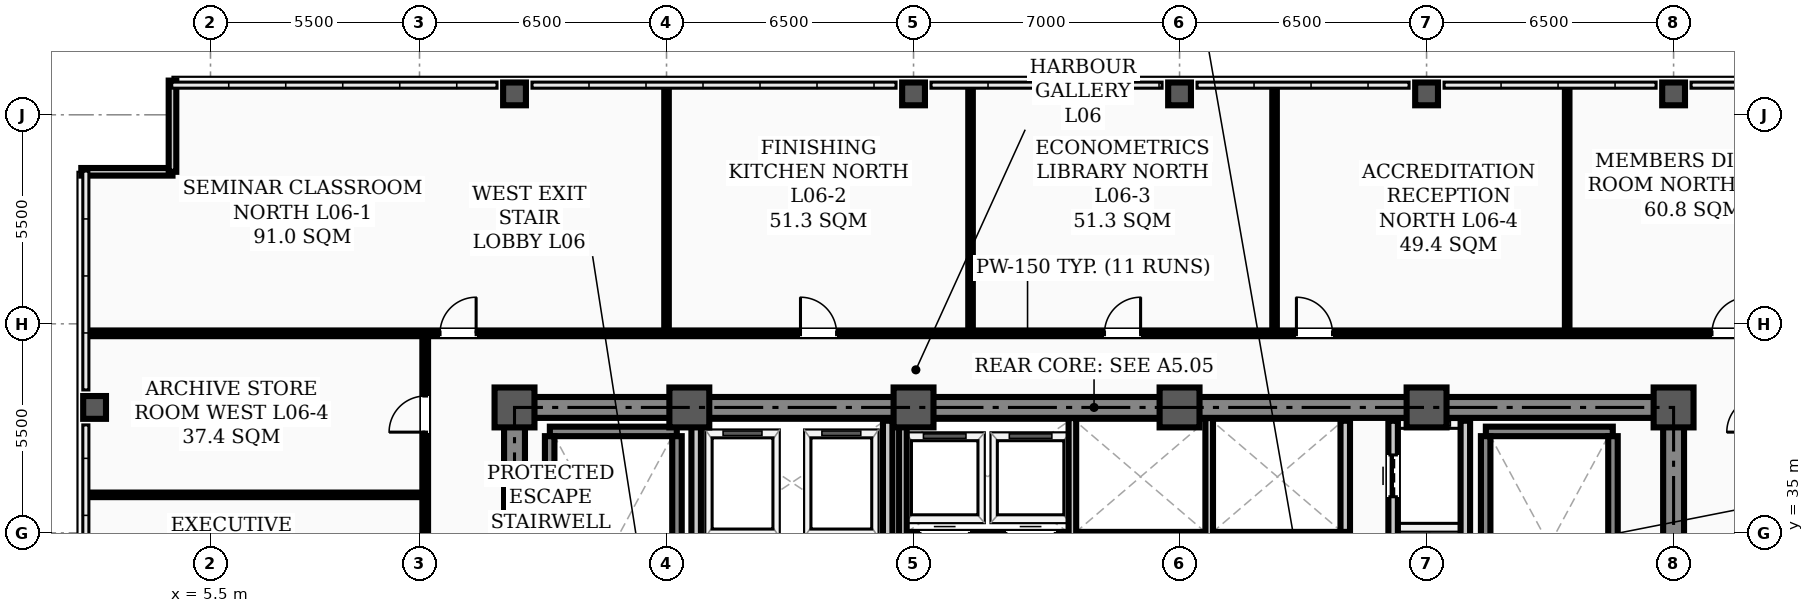
"""IFC4 building model, lengths in metres.
Left out: names, types, materials, properties, quantities, classifications, styles, units other than length and angle.
Written with IfcOpenShell. Run it as: python <this file> out.ifc"""

import sys

from ifc_helpers import new_model, si_unit, direction, frame, frame_2d, origin, origin_2d, place, context, subcontext, project, spatial, rectangle, hollow_rectangle, extrude, element, fill, save


model = new_model("IFC4")
c1 = context("Model", 3, precision=1e-05, world=origin(), true_north=direction((0.0, 1.0)))
c2 = subcontext(c1, "Body", "Model", "MODEL_VIEW")
j1 = project(units=[si_unit("LENGTHUNIT", "METRE"), si_unit("PLANEANGLEUNIT", "RADIAN")], contexts=[c1])
p1 = place(None, origin())
s1 = spatial("IfcSite", under=j1, at=p1, CompositionType="ELEMENT")
p2 = place(p1, origin())
s2 = spatial("IfcBuilding", under=s1, at=p2, CompositionType="ELEMENT")
p3 = place(p2, frame((0.0, 0.0, 26.5)))
s3 = spatial("IfcBuildingStorey", under=s2, at=p3, CompositionType="ELEMENT", Elevation=26.5)
for number, where, z_axis, x_axis in (
    (1, (13.5, 38.3, 0.0), (0.0, 0.0, 1.0), (1.0, 0.0, 0.0)),
    (2, (18.1, 38.3, 0.0), (0.0, 0.0, 1.0), (1.0, 0.0, 0.0)),
    (3, (24.0, 38.3, 0.0), (0.0, 0.0, 1.0), (1.0, 0.0, 0.0)),
    (4, (31.0, 38.3, 0.0), (0.0, 0.0, 1.0), (1.0, 0.0, 0.0)),
    (5, (37.5, 38.3, 0.0), (0.0, 0.0, 1.0), (1.0, 0.0, 0.0)),
    (6, (44.0, 38.3, 0.0), (0.0, 0.0, 1.0), (1.0, 0.0, 0.0)),
):
    element("IfcColumn", number, at=place(p3, frame(where, z_axis=z_axis, x_axis=x_axis)), inside=s3, PredefinedType="COLUMN", context=c2, shape_type="SweptSolid", body=[
        extrude(hollow_rectangle(XDim=1.05, YDim=1.05, WallThickness=0.038, InnerFilletRadius=0.019, OuterFilletRadius=0.057, at=origin_2d()), origin(), (0.0, 0.0, 1.0), 3.9),
    ])
for number, where, z_axis, x_axis in (
    (7, (2.45, 38.3, 0.0), (0.0, 0.0, 1.0), (1.0, 0.0, 0.0)),
    (8, (13.5, 46.55, 0.0), (0.0, 0.0, 1.0), (1.0, 0.0, 0.0)),
    (9, (24.0, 46.55, 0.0), (0.0, 0.0, 1.0), (1.0, 0.0, 0.0)),
    (10, (31.0, 46.55, 0.0), (0.0, 0.0, 1.0), (1.0, 0.0, 0.0)),
    (11, (37.5, 46.55, 0.0), (0.0, 0.0, 1.0), (1.0, 0.0, 0.0)),
    (12, (44.0, 46.55, 0.0), (0.0, 0.0, 1.0), (1.0, 0.0, 0.0)),
):
    element("IfcColumn", number, at=place(p3, frame(where, z_axis=z_axis, x_axis=x_axis)), inside=s3, PredefinedType="COLUMN", context=c2, shape_type="SweptSolid", body=[
        extrude(hollow_rectangle(XDim=0.6, YDim=0.6, WallThickness=0.026, InnerFilletRadius=0.013, OuterFilletRadius=0.039, at=origin_2d()), origin(), (0.0, 0.0, 1.0), 3.9),
    ])
for number, where, z_axis, x_axis in (
    (13, (2.1, 44.5, 0.0), (0.0, 0.0, 1.0), (1.0, 0.0, 0.0)),
    (14, (4.5, 44.5, 0.0), (0.0, 0.0, 1.0), (0.0, 1.0, 0.0)),
):
    element("IfcWall", number, at=place(p3, frame(where, z_axis=z_axis, x_axis=x_axis)), inside=s3, PredefinedType="PARAPET", context=c2, shape_type="SweptSolid", body=[
        extrude(rectangle(XDim=2.4, YDim=0.2, at=frame_2d((1.2, 0.0))), origin(), (0.0, 0.0, 1.0), 1.2),
    ])
p4 = place(p3, frame((13.5, 38.3, 0.0), z_axis=(0.0, 0.0, 1.0), x_axis=(1.0, 0.0, 0.0)))
e15 = element("IfcWall", 15, at=p4, inside=s3, PredefinedType="SHEAR", context=c2, shape_type="SweptSolid", body=[
    extrude(rectangle(XDim=30.5, YDim=0.55, at=frame_2d((15.25, 0.0))), origin(), (0.0, 0.0, 1.0), 3.72),
])
for number, where, z_axis, x_axis in (
    (16, (13.5, 29.35, 0.0), (0.0, 0.0, 1.0), (0.0, 1.0, 0.0)),
    (17, (44.0, 29.35, 0.0), (0.0, 0.0, 1.0), (0.0, 1.0, 0.0)),
):
    element("IfcWall", number, at=place(p3, frame(where, z_axis=z_axis, x_axis=x_axis)), inside=s3, PredefinedType="SHEAR", context=c2, shape_type="SweptSolid", body=[
        extrude(rectangle(XDim=8.6, YDim=0.55, at=frame_2d((4.3, 0.0))), origin(), (0.0, 0.0, 1.0), 3.72),
    ])
p5 = place(p3, frame((14.43, 37.669, 0.0), z_axis=(0.0, 0.0, 1.0), x_axis=(1.0, 0.0, 0.0)))
e18 = element("IfcWall", 18, at=p5, inside=s3, PredefinedType="STANDARD", context=c2, shape_type="SweptSolid", body=[
    extrude(rectangle(XDim=3.34, YDim=0.25, at=frame_2d((1.67, 0.0))), origin(), (0.0, 0.0, 1.0), 3.72),
])
for number, where, z_axis, x_axis in (
    (19, (14.425, 30.36, 0.0), (0.0, 0.0, 1.0), (0.0, 1.0, 0.0)),
    (20, (17.775, 30.36, 0.0), (0.0, 0.0, 1.0), (0.0, 1.0, 0.0)),
):
    element("IfcWall", number, at=place(p3, frame(where, z_axis=z_axis, x_axis=x_axis)), inside=s3, PredefinedType="STANDARD", context=c2, shape_type="SweptSolid", body=[
        extrude(rectangle(XDim=7.184, YDim=0.25, at=frame_2d((3.592, 0.0))), origin(), (0.0, 0.0, 1.0), 3.72),
    ])
p6 = place(p3, frame((39.06, 37.669, 0.0), z_axis=(0.0, 0.0, 1.0), x_axis=(1.0, 0.0, 0.0)))
e21 = element("IfcWall", 21, at=p6, inside=s3, PredefinedType="STANDARD", context=c2, shape_type="SweptSolid", body=[
    extrude(rectangle(XDim=3.34, YDim=0.25, at=frame_2d((1.67, 0.0))), origin(), (0.0, 0.0, 1.0), 3.72),
])
for number, where, z_axis, x_axis in (
    (22, (39.055, 30.36, 0.0), (0.0, 0.0, 1.0), (0.0, 1.0, 0.0)),
    (23, (42.405, 30.36, 0.0), (0.0, 0.0, 1.0), (0.0, 1.0, 0.0)),
):
    element("IfcWall", number, at=place(p3, frame(where, z_axis=z_axis, x_axis=x_axis)), inside=s3, PredefinedType="STANDARD", context=c2, shape_type="SweptSolid", body=[
        extrude(rectangle(XDim=7.184, YDim=0.25, at=frame_2d((3.592, 0.0))), origin(), (0.0, 0.0, 1.0), 3.72),
    ])
p7 = place(p3, frame((36.62, 31.95, 0.0), z_axis=(0.0, 0.0, 1.0), x_axis=(0.0, 1.0, 0.0)))
e24 = element("IfcWall", 24, at=p7, inside=s3, PredefinedType="STANDARD", context=c2, shape_type="SweptSolid", body=[
    extrude(rectangle(XDim=6.0, YDim=0.25, at=frame_2d((3.0, 0.0))), origin(), (0.0, 0.0, 1.0), 3.3),
])
p8 = place(p7, frame((0.9, 0.0, 0.0)))
e25 = element("IfcOpeningElement", 25, at=p8, cuts=e24, PredefinedType="OPENING", context=c2, shape_type="SweptSolid", body=[
    extrude(rectangle(XDim=1.1, YDim=2.08, at=frame_2d((0.55, 1.04))), frame((0.0, 0.135, 0.0), z_axis=(0.0, -1.0, 0.0), x_axis=(1.0, 0.0, 0.0)), (0.0, 0.0, 1.0), 0.27),
])
p9 = place(p7, frame((4.0, 0.0, 0.0)))
e26 = element("IfcOpeningElement", 26, at=p9, cuts=e24, PredefinedType="OPENING", context=c2, shape_type="SweptSolid", body=[
    extrude(rectangle(XDim=1.1, YDim=2.08, at=frame_2d((0.55, 1.04))), frame((0.0, 0.135, 0.0), z_axis=(0.0, -1.0, 0.0), x_axis=(1.0, 0.0, 0.0)), (0.0, 0.0, 1.0), 0.27),
])
p10 = place(p3, frame((38.52, 31.95, 0.0), z_axis=(0.0, 0.0, 1.0), x_axis=(0.0, 1.0, 0.0)))
e27 = element("IfcWall", 27, at=p10, inside=s3, PredefinedType="STANDARD", context=c2, shape_type="SweptSolid", body=[
    extrude(rectangle(XDim=6.0, YDim=0.25, at=frame_2d((3.0, 0.0))), origin(), (0.0, 0.0, 1.0), 3.3),
])
for number, where, z_axis, x_axis in (
    (28, (18.28, 34.62, 0.0), (0.0, 0.0, 1.0), (0.0, 1.0, 0.0)),
    (29, (23.32, 34.62, 0.0), (0.0, 0.0, 1.0), (0.0, 1.0, 0.0)),
):
    element("IfcWall", number, at=place(p3, frame(where, z_axis=z_axis, x_axis=x_axis)), inside=s3, PredefinedType="STANDARD", context=c2, shape_type="SweptSolid", body=[
        extrude(rectangle(XDim=3.33, YDim=0.25, at=frame_2d((1.665, 0.0))), origin(), (0.0, 0.0, 1.0), 3.3),
    ])
p11 = place(p3, frame((35.36, 34.9, 0.0), z_axis=(0.0, 0.0, 1.0), x_axis=(0.0, 1.0, 0.0)))
e30 = element("IfcWall", 30, at=p11, inside=s3, PredefinedType="STANDARD", context=c2, shape_type="SweptSolid", body=[
    extrude(rectangle(XDim=3.05, YDim=0.25, at=frame_2d((1.525, 0.0))), origin(), (0.0, 0.0, 1.0), 3.3),
])
p12 = place(p3, frame((23.75, 34.9, 0.0), z_axis=(0.0, 0.0, 1.0), x_axis=(1.0, 0.0, 0.0)))
e31 = element("IfcWall", 31, at=p12, inside=s3, PredefinedType="STANDARD", context=c2, shape_type="SweptSolid", body=[
    extrude(rectangle(XDim=4.4, YDim=0.25, at=frame_2d((2.2, 0.0))), origin(), (0.0, 0.0, 1.0), 3.72),
])
p13 = place(p12, frame((0.42, 0.0, 0.0)))
e32 = element("IfcOpeningElement", 32, at=p13, cuts=e31, PredefinedType="OPENING", context=c2, shape_type="SweptSolid", body=[
    extrude(rectangle(XDim=1.3, YDim=2.08, at=frame_2d((0.65, 1.04))), frame((0.0, 0.135, 0.0), z_axis=(0.0, -1.0, 0.0), x_axis=(1.0, 0.0, 0.0)), (0.0, 0.0, 1.0), 0.27),
])
p14 = place(p12, frame((2.68, 0.0, 0.0)))
e33 = element("IfcOpeningElement", 33, at=p14, cuts=e31, PredefinedType="OPENING", context=c2, shape_type="SweptSolid", body=[
    extrude(rectangle(XDim=1.3, YDim=2.08, at=frame_2d((0.65, 1.04))), frame((0.0, 0.135, 0.0), z_axis=(0.0, -1.0, 0.0), x_axis=(1.0, 0.0, 0.0)), (0.0, 0.0, 1.0), 0.27),
])
p15 = place(p3, frame((28.2, 34.9, 0.0), z_axis=(0.0, 0.0, 1.0), x_axis=(1.0, 0.0, 0.0)))
e34 = element("IfcWall", 34, at=p15, inside=s3, PredefinedType="STANDARD", context=c2, shape_type="SweptSolid", body=[
    extrude(rectangle(XDim=3.55, YDim=0.25, at=frame_2d((1.775, 0.0))), origin(), (0.0, 0.0, 1.0), 3.72),
])
p16 = place(p3, frame((31.8, 34.9, 0.0), z_axis=(0.0, 0.0, 1.0), x_axis=(1.0, 0.0, 0.0)))
e35 = element("IfcWall", 35, at=p16, inside=s3, PredefinedType="STANDARD", context=c2, shape_type="SweptSolid", body=[
    extrude(rectangle(XDim=3.6, YDim=0.25, at=frame_2d((1.8, 0.0))), origin(), (0.0, 0.0, 1.0), 3.72),
])
p17 = place(p3, frame((2.31, 36.0, 0.0), z_axis=(0.0, 0.0, 1.0), x_axis=(1.0, 0.0, 0.0)))
e36 = element("IfcWall", 36, at=p17, inside=s3, PredefinedType="PARTITIONING", context=c2, shape_type="SweptSolid", body=[
    extrude(rectangle(XDim=8.84, YDim=0.12, at=frame_2d((4.42, 0.0))), origin(), (0.0, 0.0, 1.0), 3.212),
])
p18 = place(p3, frame((2.31, 40.25, 0.0), z_axis=(0.0, 0.0, 1.0), x_axis=(1.0, 0.0, 0.0)))
e37 = element("IfcWall", 37, at=p18, inside=s3, PredefinedType="PARTITIONING", context=c2, shape_type="SweptSolid", body=[
    extrude(rectangle(XDim=49.38, YDim=0.15, at=frame_2d((24.69, 0.0))), origin(), (0.0, 0.0, 1.0), 3.1),
])
p19 = place(p18, frame((9.23, 0.0, 0.0)))
e38 = element("IfcOpeningElement", 38, at=p19, cuts=e37, PredefinedType="OPENING", context=c2, shape_type="SweptSolid", body=[
    extrude(rectangle(XDim=0.95, YDim=2.08, at=frame_2d((0.475, 1.04))), frame((0.0, 0.085, 0.0), z_axis=(0.0, -1.0, 0.0), x_axis=(1.0, 0.0, 0.0)), (0.0, 0.0, 1.0), 0.17),
])
p20 = place(p18, frame((18.715, 0.0, 0.0)))
e39 = element("IfcOpeningElement", 39, at=p20, cuts=e37, PredefinedType="OPENING", context=c2, shape_type="SweptSolid", body=[
    extrude(rectangle(XDim=0.95, YDim=2.08, at=frame_2d((0.475, 1.04))), frame((0.0, 0.085, 0.0), z_axis=(0.0, -1.0, 0.0), x_axis=(1.0, 0.0, 0.0)), (0.0, 0.0, 1.0), 0.17),
])
p21 = place(p18, frame((26.715, 0.0, 0.0)))
e40 = element("IfcOpeningElement", 40, at=p21, cuts=e37, PredefinedType="OPENING", context=c2, shape_type="SweptSolid", body=[
    extrude(rectangle(XDim=0.95, YDim=2.08, at=frame_2d((0.475, 1.04))), frame((0.0, 0.085, 0.0), z_axis=(0.0, -1.0, 0.0), x_axis=(1.0, 0.0, 0.0)), (0.0, 0.0, 1.0), 0.17),
])
p22 = place(p18, frame((31.765, 0.0, 0.0)))
e41 = element("IfcOpeningElement", 41, at=p22, cuts=e37, PredefinedType="OPENING", context=c2, shape_type="SweptSolid", body=[
    extrude(rectangle(XDim=0.95, YDim=2.08, at=frame_2d((0.475, 1.04))), frame((0.0, 0.085, 0.0), z_axis=(0.0, -1.0, 0.0), x_axis=(1.0, 0.0, 0.0)), (0.0, 0.0, 1.0), 0.17),
])
p23 = place(p18, frame((42.7, 0.0, 0.0)))
e42 = element("IfcOpeningElement", 42, at=p23, cuts=e37, PredefinedType="OPENING", context=c2, shape_type="SweptSolid", body=[
    extrude(rectangle(XDim=0.95, YDim=2.08, at=frame_2d((0.475, 1.04))), frame((0.0, 0.085, 0.0), z_axis=(0.0, -1.0, 0.0), x_axis=(1.0, 0.0, 0.0)), (0.0, 0.0, 1.0), 0.17),
])
p24 = place(p3, frame((11.15, 17.635, 0.0), z_axis=(0.0, 0.0, 1.0), x_axis=(0.0, 1.0, 0.0)))
e43 = element("IfcWall", 43, at=p24, inside=s3, PredefinedType="PARTITIONING", context=c2, shape_type="SweptSolid", body=[
    extrude(rectangle(XDim=22.53, YDim=0.15, at=frame_2d((11.265, 0.0))), origin(), (0.0, 0.0, 1.0), 3.0),
])
p25 = place(p24, frame((3.165, 0.0, 0.0)))
e44 = element("IfcOpeningElement", 44, at=p25, cuts=e43, PredefinedType="OPENING", context=c2, shape_type="SweptSolid", body=[
    extrude(rectangle(XDim=0.95, YDim=2.08, at=frame_2d((0.475, 1.04))), frame((0.0, 0.085, 0.0), z_axis=(0.0, -1.0, 0.0), x_axis=(1.0, 0.0, 0.0)), (0.0, 0.0, 1.0), 0.17),
])
p26 = place(p24, frame((8.09, 0.0, 0.0)))
e45 = element("IfcOpeningElement", 45, at=p26, cuts=e43, PredefinedType="OPENING", context=c2, shape_type="SweptSolid", body=[
    extrude(rectangle(XDim=0.95, YDim=2.08, at=frame_2d((0.475, 1.04))), frame((0.0, 0.085, 0.0), z_axis=(0.0, -1.0, 0.0), x_axis=(1.0, 0.0, 0.0)), (0.0, 0.0, 1.0), 0.17),
])
p27 = place(p24, frame((15.39, 0.0, 0.0)))
e46 = element("IfcOpeningElement", 46, at=p27, cuts=e43, PredefinedType="OPENING", context=c2, shape_type="SweptSolid", body=[
    extrude(rectangle(XDim=0.95, YDim=2.08, at=frame_2d((0.475, 1.04))), frame((0.0, 0.085, 0.0), z_axis=(0.0, -1.0, 0.0), x_axis=(1.0, 0.0, 0.0)), (0.0, 0.0, 1.0), 0.17),
])
p28 = place(p24, frame((20.015, 0.0, 0.0)))
e47 = element("IfcOpeningElement", 47, at=p28, cuts=e43, PredefinedType="OPENING", context=c2, shape_type="SweptSolid", body=[
    extrude(rectangle(XDim=0.95, YDim=2.08, at=frame_2d((0.475, 1.04))), frame((0.0, 0.085, 0.0), z_axis=(0.0, -1.0, 0.0), x_axis=(1.0, 0.0, 0.0)), (0.0, 0.0, 1.0), 0.17),
])
for number, where, z_axis, x_axis in (
    (48, (17.5, 40.335, 0.0), (0.0, 0.0, 1.0), (0.0, 1.0, 0.0)),
    (49, (25.5, 40.335, 0.0), (0.0, 0.0, 1.0), (0.0, 1.0, 0.0)),
    (50, (33.5, 40.335, 0.0), (0.0, 0.0, 1.0), (0.0, 1.0, 0.0)),
    (51, (41.2, 40.335, 0.0), (0.0, 0.0, 1.0), (0.0, 1.0, 0.0)),
):
    element("IfcWall", number, at=place(p3, frame(where, z_axis=z_axis, x_axis=x_axis)), inside=s3, PredefinedType="PARTITIONING", context=c2, shape_type="SweptSolid", body=[
        extrude(rectangle(XDim=6.355, YDim=0.12, at=frame_2d((3.177, 0.0))), origin(), (0.0, 0.0, 1.0), 3.212),
    ])
p29 = place(p3, frame((23.72, 34.9, 0.0), z_axis=(0.0, 0.0, 1.0), x_axis=(0.0, 1.0, 0.0)))
e52 = element("IfcWall", 52, at=p29, inside=s3, PredefinedType="STANDARD", context=c2, shape_type="SweptSolid", body=[
    extrude(rectangle(XDim=3.12, YDim=0.2, at=frame_2d((1.56, 0.0))), origin(), (0.0, 0.0, 1.0), 3.1),
])
for number, where, z_axis, x_axis in (
    (53, (28.18, 34.9, 0.0), (0.0, 0.0, 1.0), (0.0, 1.0, 0.0)),
    (54, (31.78, 34.9, 0.0), (0.0, 0.0, 1.0), (0.0, 1.0, 0.0)),
):
    element("IfcWall", number, at=place(p3, frame(where, z_axis=z_axis, x_axis=x_axis)), inside=s3, PredefinedType="STANDARD", context=c2, shape_type="SweptSolid", body=[
        extrude(rectangle(XDim=3.12, YDim=0.2, at=frame_2d((1.56, 0.0))), origin(), (0.0, 0.0, 1.0), 3.3),
    ])
p30 = place(p28, origin())
e55 = element("IfcDoor", 55, at=p30, inside=s3, OperationType="SINGLE_SWING_LEFT", PredefinedType="DOOR", context=c2, shape_type="SweptSolid", body=[
    extrude(rectangle(XDim=0.95, YDim=2.08, at=frame_2d((0.475, 1.04))), frame((0.0, 0.025, 0.0), z_axis=(0.0, -1.0, 0.0), x_axis=(1.0, 0.0, 0.0)), (0.0, 0.0, 1.0), 0.05),
])
fill(e47, e55)
p31 = place(p19, origin())
e56 = element("IfcDoor", 56, at=p31, inside=s3, OperationType="SINGLE_SWING_RIGHT", PredefinedType="DOOR", context=c2, shape_type="SweptSolid", body=[
    extrude(rectangle(XDim=0.95, YDim=2.08, at=frame_2d((0.475, 1.04))), frame((0.0, 0.025, 0.0), z_axis=(0.0, -1.0, 0.0), x_axis=(1.0, 0.0, 0.0)), (0.0, 0.0, 1.0), 0.05),
])
fill(e38, e56)
p32 = place(p20, origin())
e57 = element("IfcDoor", 57, at=p32, inside=s3, OperationType="SINGLE_SWING_LEFT", PredefinedType="DOOR", context=c2, shape_type="SweptSolid", body=[
    extrude(rectangle(XDim=0.95, YDim=2.08, at=frame_2d((0.475, 1.04))), frame((0.0, 0.025, 0.0), z_axis=(0.0, -1.0, 0.0), x_axis=(1.0, 0.0, 0.0)), (0.0, 0.0, 1.0), 0.05),
])
fill(e39, e57)
p33 = place(p21, origin())
e58 = element("IfcDoor", 58, at=p33, inside=s3, OperationType="SINGLE_SWING_RIGHT", PredefinedType="DOOR", context=c2, shape_type="SweptSolid", body=[
    extrude(rectangle(XDim=0.95, YDim=2.08, at=frame_2d((0.475, 1.04))), frame((0.0, 0.025, 0.0), z_axis=(0.0, -1.0, 0.0), x_axis=(1.0, 0.0, 0.0)), (0.0, 0.0, 1.0), 0.05),
])
fill(e40, e58)
p34 = place(p22, origin())
e59 = element("IfcDoor", 59, at=p34, inside=s3, OperationType="SINGLE_SWING_LEFT", PredefinedType="DOOR", context=c2, shape_type="SweptSolid", body=[
    extrude(rectangle(XDim=0.95, YDim=2.08, at=frame_2d((0.475, 1.04))), frame((0.0, 0.025, 0.0), z_axis=(0.0, -1.0, 0.0), x_axis=(1.0, 0.0, 0.0)), (0.0, 0.0, 1.0), 0.05),
])
fill(e41, e59)
p35 = place(p23, origin())
e60 = element("IfcDoor", 60, at=p35, inside=s3, OperationType="SINGLE_SWING_RIGHT", PredefinedType="DOOR", context=c2, shape_type="SweptSolid", body=[
    extrude(rectangle(XDim=0.95, YDim=2.08, at=frame_2d((0.475, 1.04))), frame((0.0, 0.025, 0.0), z_axis=(0.0, -1.0, 0.0), x_axis=(1.0, 0.0, 0.0)), (0.0, 0.0, 1.0), 0.05),
])
fill(e42, e60)
p36 = place(p9, origin())
e61 = element("IfcDoor", 61, at=p36, inside=s3, OperationType="SLIDING_TO_LEFT", PredefinedType="DOOR", context=c2, shape_type="SweptSolid", body=[
    extrude(rectangle(XDim=1.1, YDim=2.08, at=frame_2d((0.55, 1.04))), frame((0.0, 0.025, 0.0), z_axis=(0.0, -1.0, 0.0), x_axis=(1.0, 0.0, 0.0)), (0.0, 0.0, 1.0), 0.05),
])
fill(e26, e61)
save(model, sys.argv[1])
